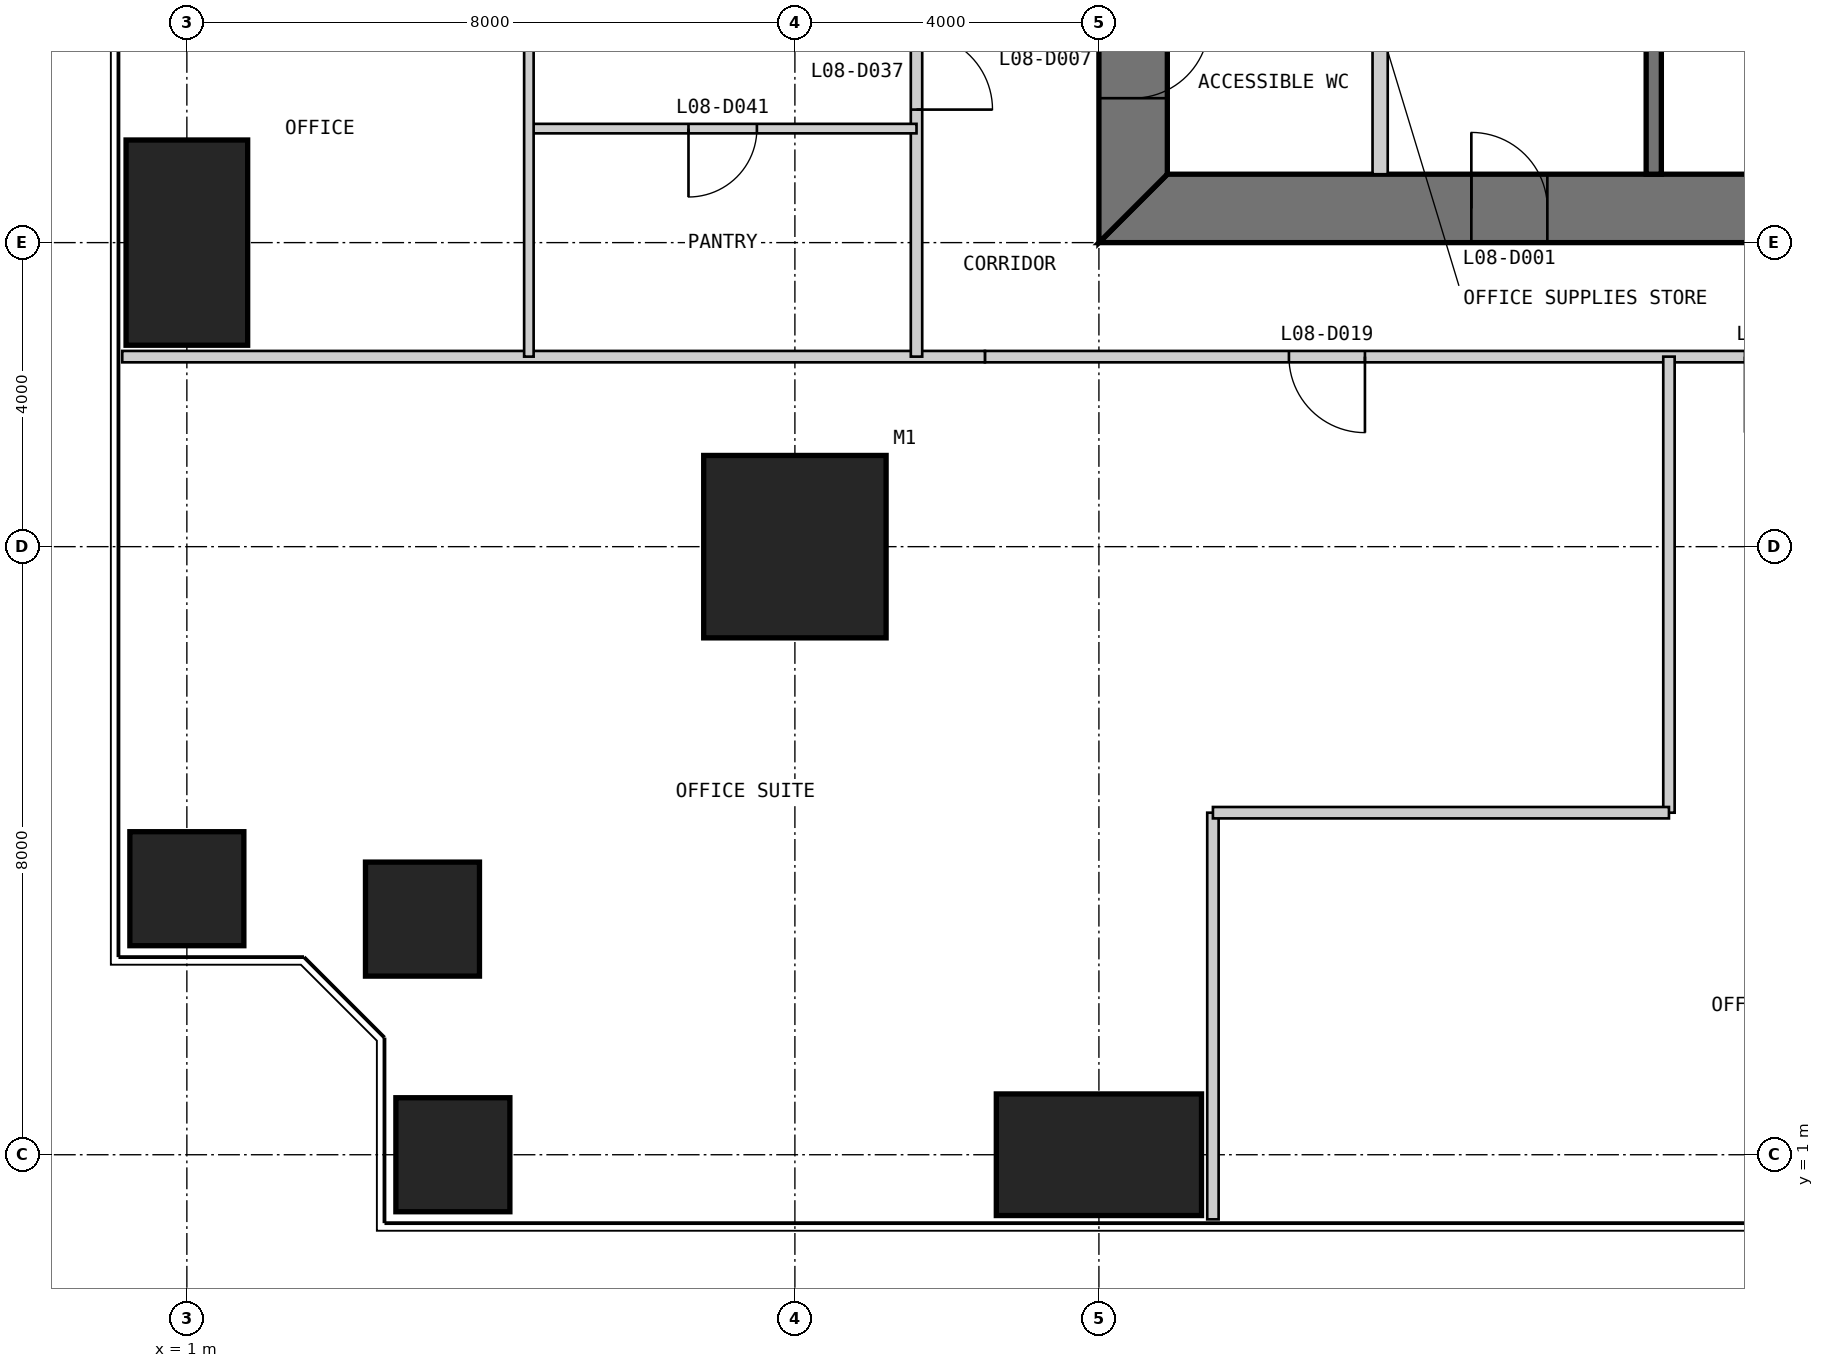
"""IFC4 building model, lengths in metres.
Left out: names, types, materials, properties, quantities, classifications, styles, units other than length and angle.
Written with IfcOpenShell. Run it as: python <this file> out.ifc"""

import sys

from ifc_helpers import new_model, si_unit, direction, frame, frame_2d, origin, origin_2d, place, context, subcontext, project, spatial, polyline, rectangle, outline, extrude, element, fill, save


model = new_model("IFC4")
c1 = context("Model", 3, precision=1e-05, world=origin(), true_north=direction((0.0, 1.0)))
c2 = subcontext(c1, "Body", "Model", "MODEL_VIEW")
j1 = project(units=[si_unit("LENGTHUNIT", "METRE"), si_unit("PLANEANGLEUNIT", "RADIAN")], contexts=[c1])
p1 = place(None, origin())
s1 = spatial("IfcSite", under=j1, at=p1, CompositionType="ELEMENT")
p2 = place(p1, origin())
s2 = spatial("IfcBuilding", under=s1, at=p2, CompositionType="ELEMENT")
p3 = place(p2, frame((0.0, 0.0, 39.0)))
s3 = spatial("IfcBuildingStorey", under=s2, at=p3, CompositionType="ELEMENT", Elevation=39.0)
p4 = place(p3, frame((9.0, 9.0, 0.0), z_axis=(0.0, 0.0, 1.0), x_axis=(1.0, 0.0, 0.0)))
e1 = element("IfcColumn", 1, at=p4, inside=s3, PredefinedType="COLUMN", context=c2, shape_type="SweptSolid", body=[
    extrude(rectangle(XDim=2.4, YDim=2.4, at=origin_2d()), origin(), (0.0, 0.0, 1.0), 4.0),
])
p5 = place(p3, frame((4.5, 1.0, 0.0), z_axis=(0.0, 0.0, 1.0), x_axis=(1.0, 0.0, 0.0)))
e2 = element("IfcColumn", 2, at=p5, inside=s3, PredefinedType="COLUMN", context=c2, shape_type="SweptSolid", body=[
    extrude(rectangle(XDim=1.5, YDim=1.5, at=origin_2d()), origin(), (0.0, 0.0, 1.0), 4.0),
])
p6 = place(p3, frame((13.0, 1.0, 0.0), z_axis=(0.0, 0.0, 1.0), x_axis=(1.0, 0.0, 0.0)))
e3 = element("IfcColumn", 3, at=p6, inside=s3, PredefinedType="COLUMN", context=c2, shape_type="SweptSolid", body=[
    extrude(rectangle(XDim=2.7, YDim=1.6, at=origin_2d()), origin(), (0.0, 0.0, 1.0), 4.0),
])
p7 = place(p3, frame((1.0, 13.0, 0.0), z_axis=(0.0, 0.0, 1.0), x_axis=(1.0, 0.0, 0.0)))
e4 = element("IfcColumn", 4, at=p7, inside=s3, PredefinedType="COLUMN", context=c2, shape_type="SweptSolid", body=[
    extrude(rectangle(XDim=1.6, YDim=2.7, at=origin_2d()), origin(), (0.0, 0.0, 1.0), 4.0),
])
for number, where, z_axis, x_axis in (
    (5, (1.0, 4.5, 0.0), (0.0, 0.0, 1.0), (1.0, 0.0, 0.0)),
    (6, (4.1, 4.1, 0.0), (0.0, 0.0, 1.0), (1.0, 0.0, 0.0)),
):
    element("IfcColumn", number, at=place(p3, frame(where, z_axis=z_axis, x_axis=x_axis)), inside=s3, PredefinedType="COLUMN", context=c2, shape_type="SweptSolid", body=[
        extrude(rectangle(XDim=1.5, YDim=1.5, at=origin_2d()), origin(), (0.0, 0.0, 1.0), 4.0),
    ])
p8 = place(p3, frame((13.0, 13.45, 0.0), z_axis=(0.0, 0.0, 1.0), x_axis=(1.0, 0.0, 0.0)))
e7 = element("IfcWall", 7, at=p8, inside=s3, PredefinedType="SHEAR", context=c2, shape_type="SweptSolid", body=[
    extrude(outline(polyline([(0.0, -0.45), (24.0, -0.45), (23.1, 0.45), (0.9, 0.45), (0.0, -0.45)])), origin(), (0.0, 0.0, 1.0), 4.0),
])
p9 = place(p8, frame((4.9, 0.0, 0.0)))
e8 = element("IfcOpeningElement", 8, at=p9, cuts=e7, PredefinedType="OPENING", context=c2, shape_type="SweptSolid", body=[
    extrude(rectangle(XDim=1.0, YDim=2.2, at=frame_2d((0.5, 1.1))), frame((0.0, 0.46, 0.0), z_axis=(0.0, -1.0, 0.0), x_axis=(1.0, 0.0, 0.0)), (0.0, 0.0, 1.0), 0.92),
])
p10 = place(p8, frame((8.9, 0.0, 0.0)))
e9 = element("IfcOpeningElement", 9, at=p10, cuts=e7, PredefinedType="OPENING", context=c2, shape_type="SweptSolid", body=[
    extrude(rectangle(XDim=1.1, YDim=2.2, at=frame_2d((0.55, 1.1))), frame((0.0, 0.46, 0.0), z_axis=(0.0, -1.0, 0.0), x_axis=(1.0, 0.0, 0.0)), (0.0, 0.0, 1.0), 0.92),
])
p11 = place(p8, frame((15.05, 0.0, 0.0)))
e10 = element("IfcOpeningElement", 10, at=p11, cuts=e7, PredefinedType="OPENING", context=c2, shape_type="SweptSolid", body=[
    extrude(rectangle(XDim=0.9, YDim=2.2, at=frame_2d((0.45, 1.1))), frame((0.0, 0.46, 0.0), z_axis=(0.0, -1.0, 0.0), x_axis=(1.0, 0.0, 0.0)), (0.0, 0.0, 1.0), 0.92),
])
p12 = place(p8, frame((17.9, 0.0, 0.0)))
e11 = element("IfcOpeningElement", 11, at=p12, cuts=e7, PredefinedType="OPENING", context=c2, shape_type="SweptSolid", body=[
    extrude(rectangle(XDim=1.0, YDim=2.2, at=frame_2d((0.5, 1.1))), frame((0.0, 0.46, 0.0), z_axis=(0.0, -1.0, 0.0), x_axis=(1.0, 0.0, 0.0)), (0.0, 0.0, 1.0), 0.92),
])
p13 = place(p8, frame((21.4, 0.0, 0.0)))
e12 = element("IfcOpeningElement", 12, at=p13, cuts=e7, PredefinedType="OPENING", context=c2, shape_type="SweptSolid", body=[
    extrude(rectangle(XDim=1.0, YDim=2.2, at=frame_2d((0.5, 1.1))), frame((0.0, 0.46, 0.0), z_axis=(0.0, -1.0, 0.0), x_axis=(1.0, 0.0, 0.0)), (0.0, 0.0, 1.0), 0.92),
])
p14 = place(p3, frame((13.45, 36.1, 0.0), z_axis=(0.0, 0.0, 1.0), x_axis=(0.0, -1.0, 0.0)))
e13 = element("IfcWall", 13, at=p14, inside=s3, PredefinedType="SHEAR", context=c2, shape_type="SweptSolid", body=[
    extrude(outline(polyline([(-0.9, -0.45), (23.1, -0.45), (22.2, 0.45), (0.0, 0.45), (-0.9, -0.45)])), origin(), (0.0, 0.0, 1.0), 4.0),
])
p15 = place(p14, frame((20.2, 0.0, 0.0)))
e14 = element("IfcOpeningElement", 14, at=p15, cuts=e13, PredefinedType="OPENING", context=c2, shape_type="SweptSolid", body=[
    extrude(rectangle(XDim=1.0, YDim=2.2, at=frame_2d((0.5, 1.1))), frame((0.0, 0.46, 0.0), z_axis=(0.0, -1.0, 0.0), x_axis=(1.0, 0.0, 0.0)), (0.0, 0.0, 1.0), 0.92),
])
p16 = place(p14, frame((17.25, 0.0, 0.0)))
e15 = element("IfcOpeningElement", 15, at=p16, cuts=e13, PredefinedType="OPENING", context=c2, shape_type="SweptSolid", body=[
    extrude(rectangle(XDim=0.9, YDim=2.2, at=frame_2d((0.45, 1.1))), frame((0.0, 0.46, 0.0), z_axis=(0.0, -1.0, 0.0), x_axis=(1.0, 0.0, 0.0)), (0.0, 0.0, 1.0), 0.92),
])
p17 = place(p3, frame((16.7, 13.9, 0.0), z_axis=(0.0, 0.0, 1.0), x_axis=(0.0, 1.0, 0.0)))
e16 = element("IfcWall", 16, at=p17, inside=s3, PredefinedType="PARTITIONING", context=c2, shape_type="SweptSolid", body=[
    extrude(rectangle(XDim=16.1, YDim=0.2, at=frame_2d((8.05, 0.0))), origin(), (0.0, 0.0, 1.0), 3.8),
])
p18 = place(p17, frame((3.8, 0.0, 0.0)))
e17 = element("IfcOpeningElement", 17, at=p18, cuts=e16, PredefinedType="OPENING", context=c2, shape_type="SweptSolid", body=[
    extrude(rectangle(XDim=0.9, YDim=2.2, at=frame_2d((0.45, 1.1))), frame((0.0, 0.11, 0.0), z_axis=(0.0, -1.0, 0.0), x_axis=(1.0, 0.0, 0.0)), (0.0, 0.0, 1.0), 0.22),
])
p19 = place(p17, frame((7.217, 0.0, 0.0)))
e18 = element("IfcOpeningElement", 18, at=p19, cuts=e16, PredefinedType="OPENING", context=c2, shape_type="SweptSolid", body=[
    extrude(rectangle(XDim=1.1, YDim=2.2, at=frame_2d((0.55, 1.1))), frame((0.0, 0.11, 0.0), z_axis=(0.0, -1.0, 0.0), x_axis=(1.0, 0.0, 0.0)), (0.0, 0.0, 1.0), 0.22),
])
p20 = place(p17, frame((10.55, 0.0, 0.0)))
e19 = element("IfcOpeningElement", 19, at=p20, cuts=e16, PredefinedType="OPENING", context=c2, shape_type="SweptSolid", body=[
    extrude(rectangle(XDim=1.1, YDim=2.2, at=frame_2d((0.55, 1.1))), frame((0.0, 0.11, 0.0), z_axis=(0.0, -1.0, 0.0), x_axis=(1.0, 0.0, 0.0)), (0.0, 0.0, 1.0), 0.22),
])
p21 = place(p17, frame((13.883, 0.0, 0.0)))
e20 = element("IfcOpeningElement", 20, at=p21, cuts=e16, PredefinedType="OPENING", context=c2, shape_type="SweptSolid", body=[
    extrude(rectangle(XDim=1.1, YDim=2.2, at=frame_2d((0.55, 1.1))), frame((0.0, 0.11, 0.0), z_axis=(0.0, -1.0, 0.0), x_axis=(1.0, 0.0, 0.0)), (0.0, 0.0, 1.0), 0.22),
])
p22 = place(p3, frame((20.3, 13.9, 0.0), z_axis=(0.0, 0.0, 1.0), x_axis=(0.0, 1.0, 0.0)))
e21 = element("IfcWall", 21, at=p22, inside=s3, PredefinedType="SOLIDWALL", context=c2, shape_type="SweptSolid", body=[
    extrude(rectangle(XDim=16.1, YDim=0.2, at=frame_2d((8.05, 0.0))), origin(), (0.0, 0.0, 1.0), 3.8),
])
p23 = place(p3, frame((11.5, 11.5, 0.0), z_axis=(0.0, 0.0, 1.0), x_axis=(1.0, 0.0, 0.0)))
e22 = element("IfcWall", 22, at=p23, inside=s3, PredefinedType="PARTITIONING", context=c2, shape_type="SweptSolid", body=[
    extrude(rectangle(XDim=27.0, YDim=0.15, at=frame_2d((13.5, 0.0))), origin(), (0.0, 0.0, 1.0), 3.85),
])
p24 = place(p23, frame((4.0, 0.0, 0.0)))
e23 = element("IfcOpeningElement", 23, at=p24, cuts=e22, PredefinedType="OPENING", context=c2, shape_type="SweptSolid", body=[
    extrude(rectangle(XDim=1.0, YDim=2.2, at=frame_2d((0.5, 1.1))), frame((0.0, 0.085, 0.0), z_axis=(0.0, -1.0, 0.0), x_axis=(1.0, 0.0, 0.0)), (0.0, 0.0, 1.0), 0.17),
])
p25 = place(p23, frame((10.0, 0.0, 0.0)))
e24 = element("IfcOpeningElement", 24, at=p25, cuts=e22, PredefinedType="OPENING", context=c2, shape_type="SweptSolid", body=[
    extrude(rectangle(XDim=1.0, YDim=2.2, at=frame_2d((0.5, 1.1))), frame((0.0, 0.085, 0.0), z_axis=(0.0, -1.0, 0.0), x_axis=(1.0, 0.0, 0.0)), (0.0, 0.0, 1.0), 0.17),
])
p26 = place(p23, frame((17.5, 0.0, 0.0)))
e25 = element("IfcOpeningElement", 25, at=p26, cuts=e22, PredefinedType="OPENING", context=c2, shape_type="SweptSolid", body=[
    extrude(rectangle(XDim=1.0, YDim=2.2, at=frame_2d((0.5, 1.1))), frame((0.0, 0.085, 0.0), z_axis=(0.0, -1.0, 0.0), x_axis=(1.0, 0.0, 0.0)), (0.0, 0.0, 1.0), 0.17),
])
p27 = place(p23, frame((23.5, 0.0, 0.0)))
e26 = element("IfcOpeningElement", 26, at=p27, cuts=e22, PredefinedType="OPENING", context=c2, shape_type="SweptSolid", body=[
    extrude(rectangle(XDim=1.0, YDim=2.2, at=frame_2d((0.5, 1.1))), frame((0.0, 0.085, 0.0), z_axis=(0.0, -1.0, 0.0), x_axis=(1.0, 0.0, 0.0)), (0.0, 0.0, 1.0), 0.17),
])
p28 = place(p3, frame((0.15, 11.5, 0.0), z_axis=(0.0, 0.0, 1.0), x_axis=(1.0, 0.0, 0.0)))
e27 = element("IfcWall", 27, at=p28, inside=s3, PredefinedType="PARTITIONING", context=c2, shape_type="SweptSolid", body=[
    extrude(rectangle(XDim=11.35, YDim=0.15, at=frame_2d((5.675, 0.0))), origin(), (0.0, 0.0, 1.0), 3.85),
])
p29 = place(p3, frame((14.5, 0.15, 0.0), z_axis=(0.0, 0.0, 1.0), x_axis=(0.0, 1.0, 0.0)))
e28 = element("IfcWall", 28, at=p29, inside=s3, PredefinedType="PARTITIONING", context=c2, shape_type="SweptSolid", body=[
    extrude(rectangle(XDim=5.35, YDim=0.15, at=frame_2d((2.675, 0.0))), origin(), (0.0, 0.0, 1.0), 3.85),
])
for number, where, z_axis, x_axis in (
    (29, (20.5, 5.5, 0.0), (0.0, 0.0, 1.0), (0.0, 1.0, 0.0)),
    (30, (14.5, 5.5, 0.0), (0.0, 0.0, 1.0), (1.0, 0.0, 0.0)),
):
    element("IfcWall", number, at=place(p3, frame(where, z_axis=z_axis, x_axis=x_axis)), inside=s3, PredefinedType="PARTITIONING", context=c2, shape_type="SweptSolid", body=[
        extrude(rectangle(XDim=6.0, YDim=0.15, at=frame_2d((3.0, 0.0))), origin(), (0.0, 0.0, 1.0), 3.85),
    ])
p30 = place(p3, frame((10.6, 38.5, 0.0), z_axis=(0.0, 0.0, 1.0), x_axis=(0.0, -1.0, 0.0)))
e31 = element("IfcWall", 31, at=p30, inside=s3, PredefinedType="PARTITIONING", context=c2, shape_type="SweptSolid", body=[
    extrude(rectangle(XDim=27.0, YDim=0.15, at=frame_2d((13.5, 0.0))), origin(), (0.0, 0.0, 1.0), 3.85),
])
p31 = place(p30, frame((0.25, 0.0, 0.0)))
e32 = element("IfcOpeningElement", 32, at=p31, cuts=e31, PredefinedType="OPENING", context=c2, shape_type="SweptSolid", body=[
    extrude(rectangle(XDim=1.0, YDim=2.2, at=frame_2d((0.5, 1.1))), frame((0.0, 0.085, 0.0), z_axis=(0.0, -1.0, 0.0), x_axis=(1.0, 0.0, 0.0)), (0.0, 0.0, 1.0), 0.17),
])
p32 = place(p30, frame((22.75, 0.0, 0.0)))
e33 = element("IfcOpeningElement", 33, at=p32, cuts=e31, PredefinedType="OPENING", context=c2, shape_type="SweptSolid", body=[
    extrude(rectangle(XDim=1.0, YDim=2.2, at=frame_2d((0.5, 1.1))), frame((0.0, 0.085, 0.0), z_axis=(0.0, -1.0, 0.0), x_axis=(1.0, 0.0, 0.0)), (0.0, 0.0, 1.0), 0.17),
])
p33 = place(p3, frame((5.5, 14.5, 0.0), z_axis=(0.0, 0.0, 1.0), x_axis=(1.0, 0.0, 0.0)))
e34 = element("IfcWall", 34, at=p33, inside=s3, PredefinedType="PARTITIONING", context=c2, shape_type="SweptSolid", body=[
    extrude(rectangle(XDim=5.1, YDim=0.125, at=frame_2d((2.55, 0.0))), origin(), (0.0, 0.0, 1.0), 3.85),
])
p34 = place(p33, frame((2.1, 0.0, 0.0)))
e35 = element("IfcOpeningElement", 35, at=p34, cuts=e34, PredefinedType="OPENING", context=c2, shape_type="SweptSolid", body=[
    extrude(rectangle(XDim=0.9, YDim=2.2, at=frame_2d((0.45, 1.1))), frame((0.0, 0.073, 0.0), z_axis=(0.0, -1.0, 0.0), x_axis=(1.0, 0.0, 0.0)), (0.0, 0.0, 1.0), 0.145),
])
p35 = place(p3, frame((5.5, 29.5, 0.0), z_axis=(0.0, 0.0, 1.0), x_axis=(0.0, -1.0, 0.0)))
e36 = element("IfcWall", 36, at=p35, inside=s3, PredefinedType="PARTITIONING", context=c2, shape_type="SweptSolid", body=[
    extrude(rectangle(XDim=18.0, YDim=0.125, at=frame_2d((9.0, 0.0))), origin(), (0.0, 0.0, 1.0), 3.85),
])
p36 = place(p35, frame((10.0, 0.0, 0.0)))
e37 = element("IfcOpeningElement", 37, at=p36, cuts=e36, PredefinedType="OPENING", context=c2, shape_type="SweptSolid", body=[
    extrude(rectangle(XDim=1.0, YDim=2.2, at=frame_2d((0.5, 1.1))), frame((0.0, 0.073, 0.0), z_axis=(0.0, -1.0, 0.0), x_axis=(1.0, 0.0, 0.0)), (0.0, 0.0, 1.0), 0.145),
])
p37 = place(p35, frame((13.05, 0.0, 0.0)))
e38 = element("IfcOpeningElement", 38, at=p37, cuts=e36, PredefinedType="OPENING", context=c2, shape_type="SweptSolid", body=[
    extrude(rectangle(XDim=0.9, YDim=2.2, at=frame_2d((0.45, 1.1))), frame((0.0, 0.073, 0.0), z_axis=(0.0, -1.0, 0.0), x_axis=(1.0, 0.0, 0.0)), (0.0, 0.0, 1.0), 0.145),
])
p38 = place(p9, origin())
e39 = element("IfcDoor", 39, at=p38, inside=s3, OperationType="SINGLE_SWING_LEFT", PredefinedType="DOOR", context=c2, shape_type="SweptSolid", body=[
    extrude(rectangle(XDim=1.0, YDim=2.2, at=frame_2d((0.5, 1.1))), frame((0.0, 0.025, 0.0), z_axis=(0.0, -1.0, 0.0), x_axis=(1.0, 0.0, 0.0)), (0.0, 0.0, 1.0), 0.05),
    extrude(outline(polyline([(0.0, 0.0), (0.04, 0.0), (0.04, 2.16), (0.96, 2.16), (0.96, 0.0), (1.0, 0.0), (1.0, 2.2), (0.0, 2.2), (0.0, 0.0)])), frame((0.0, 0.3, 0.0), z_axis=(0.0, -1.0, 0.0), x_axis=(1.0, 0.0, 0.0)), (0.0, 0.0, 1.0), 0.6),
])
fill(e8, e39)
p39 = place(p15, origin())
e40 = element("IfcDoor", 40, at=p39, inside=s3, OperationType="SINGLE_SWING_LEFT", PredefinedType="DOOR", context=c2, shape_type="SweptSolid", body=[
    extrude(rectangle(XDim=1.0, YDim=2.2, at=frame_2d((0.5, 1.1))), frame((0.0, 0.025, 0.0), z_axis=(0.0, -1.0, 0.0), x_axis=(1.0, 0.0, 0.0)), (0.0, 0.0, 1.0), 0.05),
    extrude(outline(polyline([(0.0, 0.0), (0.04, 0.0), (0.04, 2.16), (0.96, 2.16), (0.96, 0.0), (1.0, 0.0), (1.0, 2.2), (0.0, 2.2), (0.0, 0.0)])), frame((0.0, 0.3, 0.0), z_axis=(0.0, -1.0, 0.0), x_axis=(1.0, 0.0, 0.0)), (0.0, 0.0, 1.0), 0.6),
])
fill(e14, e40)
p40 = place(p24, frame((1.0, 0.0, 0.0), z_axis=(0.0, 0.0, 1.0), x_axis=(-1.0, 0.0, 0.0)))
e41 = element("IfcDoor", 41, at=p40, inside=s3, OperationType="SINGLE_SWING_LEFT", PredefinedType="DOOR", context=c2, shape_type="SweptSolid", body=[
    extrude(rectangle(XDim=1.0, YDim=2.2, at=frame_2d((0.5, 1.1))), frame((0.0, 0.025, 0.0), z_axis=(0.0, -1.0, 0.0), x_axis=(1.0, 0.0, 0.0)), (0.0, 0.0, 1.0), 0.05),
])
fill(e23, e41)
p41 = place(p32, origin())
e42 = element("IfcDoor", 42, at=p41, inside=s3, OperationType="SINGLE_SWING_RIGHT", PredefinedType="DOOR", context=c2, shape_type="SweptSolid", body=[
    extrude(rectangle(XDim=1.0, YDim=2.2, at=frame_2d((0.5, 1.1))), frame((0.0, 0.025, 0.0), z_axis=(0.0, -1.0, 0.0), x_axis=(1.0, 0.0, 0.0)), (0.0, 0.0, 1.0), 0.05),
])
fill(e33, e42)
p42 = place(p34, frame((0.9, 0.0, 0.0), z_axis=(0.0, 0.0, 1.0), x_axis=(-1.0, 0.0, 0.0)))
e43 = element("IfcDoor", 43, at=p42, inside=s3, OperationType="SINGLE_SWING_RIGHT", PredefinedType="DOOR", context=c2, shape_type="SweptSolid", body=[
    extrude(rectangle(XDim=0.9, YDim=2.2, at=frame_2d((0.45, 1.1))), frame((0.0, 0.025, 0.0), z_axis=(0.0, -1.0, 0.0), x_axis=(1.0, 0.0, 0.0)), (0.0, 0.0, 1.0), 0.05),
])
fill(e35, e43)
save(model, sys.argv[1])
